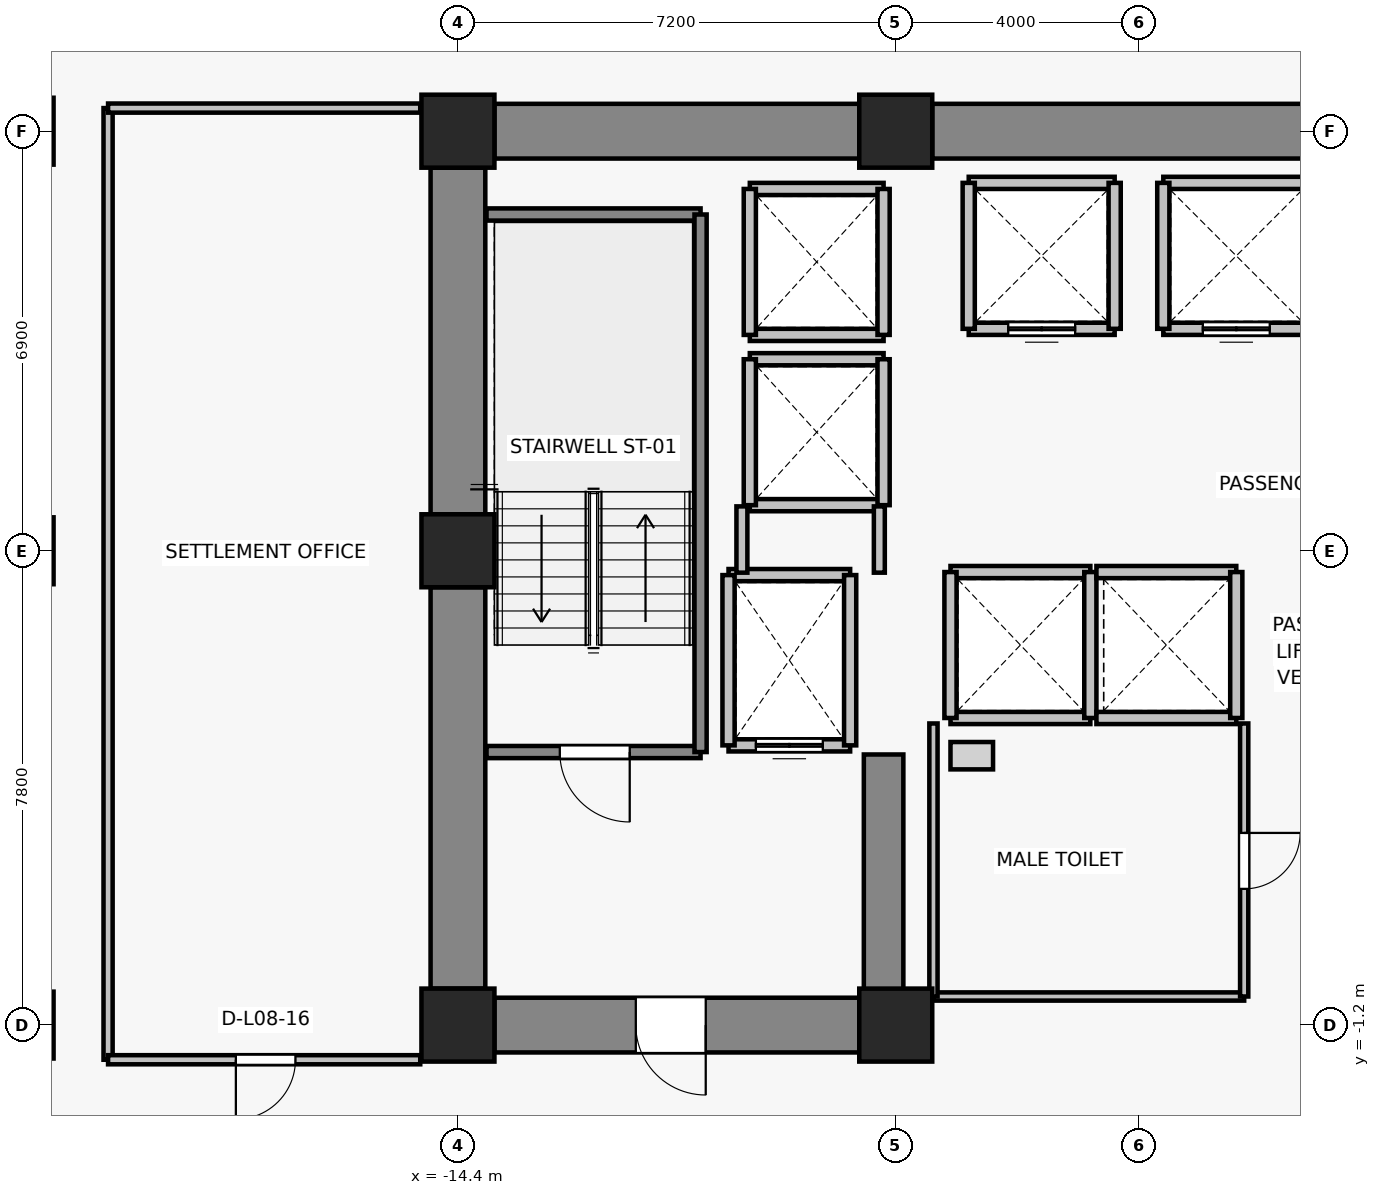
"""IFC4 building model, lengths in metres.
Left out: names, types, materials, properties, quantities, classifications, styles, units other than length and angle.
Written with IfcOpenShell. Run it as: python <this file> out.ifc"""

import sys

from ifc_helpers import new_model, si_unit, direction, frame, frame_2d, origin, origin_2d, place, context, subcontext, project, spatial, rectangle, extrude, source, transform, mapped, element, fill, save


model = new_model("IFC4")
c1 = context("Model", 3, precision=1e-05, world=origin(), true_north=direction((0.0, 1.0)))
c2 = subcontext(c1, "Body", "Model", "MODEL_VIEW")
j1 = project(units=[si_unit("LENGTHUNIT", "METRE"), si_unit("PLANEANGLEUNIT", "RADIAN")], contexts=[c1])
p1 = place(None, origin())
s1 = spatial("IfcSite", under=j1, at=p1, CompositionType="ELEMENT")
p2 = place(p1, origin())
s2 = spatial("IfcBuilding", under=s1, at=p2, CompositionType="ELEMENT")
p3 = place(p2, frame((0.0, 0.0, 34.0)))
s3 = spatial("IfcBuildingStorey", under=s2, at=p3, CompositionType="ELEMENT", Elevation=34.0)
for number, where, z_axis, x_axis in (
    (1, (-14.4, -1.2, 0.0), (0.0, 0.0, 1.0), (1.0, 0.0, 0.0)),
    (2, (-7.2, -1.2, 0.0), (0.0, 0.0, 1.0), (1.0, 0.0, 0.0)),
    (3, (-14.4, 6.6, 0.0), (0.0, 0.0, 1.0), (1.0, 0.0, 0.0)),
    (4, (-14.4, 13.5, 0.0), (0.0, 0.0, 1.0), (1.0, 0.0, 0.0)),
    (5, (-7.2, 13.5, 0.0), (0.0, 0.0, 1.0), (1.0, 0.0, 0.0)),
):
    element("IfcColumn", number, at=place(p3, frame(where, z_axis=z_axis, x_axis=x_axis)), inside=s3, PredefinedType="COLUMN", context=c2, shape_type="SweptSolid", body=[
        extrude(rectangle(XDim=1.2, YDim=1.2, at=origin_2d()), origin(), (0.0, 0.0, 1.0), 3.3),
    ])
for number, where, z_axis, x_axis in (
    (6, (-21.6, -1.2, 0.0), (0.0, 0.0, 1.0), (1.0, 0.0, 0.0)),
    (7, (-21.6, 6.6, 0.0), (0.0, 0.0, 1.0), (1.0, 0.0, 0.0)),
    (8, (-21.6, 13.5, 0.0), (0.0, 0.0, 1.0), (1.0, 0.0, 0.0)),
):
    element("IfcColumn", number, at=place(p3, frame(where, z_axis=z_axis, x_axis=x_axis)), inside=s3, PredefinedType="COLUMN", context=c2, shape_type="SweptSolid", body=[
        extrude(rectangle(XDim=1.1, YDim=1.1, at=origin_2d()), origin(), (0.0, 0.0, 1.0), 3.3),
    ])
p4 = place(p3, frame((-13.8, 13.5, 0.0), z_axis=(0.0, 0.0, 1.0), x_axis=(1.0, 0.0, 0.0)))
e9 = element("IfcWall", 9, at=p4, inside=s3, PredefinedType="SHEAR", context=c2, shape_type="SweptSolid", body=[
    extrude(rectangle(XDim=6.0, YDim=0.9, at=frame_2d((3.0, 0.0))), origin(), (0.0, 0.0, 1.0), 3.075),
])
p5 = place(p3, frame((-6.6, 13.5, 0.0), z_axis=(0.0, 0.0, 1.0), x_axis=(1.0, 0.0, 0.0)))
e10 = element("IfcWall", 10, at=p5, inside=s3, PredefinedType="SHEAR", context=c2, shape_type="SweptSolid", body=[
    extrude(rectangle(XDim=13.2, YDim=0.9, at=frame_2d((6.6, 0.0))), origin(), (0.0, 0.0, 1.0), 3.075),
])
p6 = place(p3, frame((-14.4, -0.6, 0.0), z_axis=(0.0, 0.0, 1.0), x_axis=(0.0, 1.0, 0.0)))
e11 = element("IfcWall", 11, at=p6, inside=s3, PredefinedType="SHEAR", context=c2, shape_type="SweptSolid", body=[
    extrude(rectangle(XDim=6.6, YDim=0.9, at=frame_2d((3.3, 0.0))), origin(), (0.0, 0.0, 1.0), 3.075),
])
p7 = place(p3, frame((-14.4, 7.2, 0.0), z_axis=(0.0, 0.0, 1.0), x_axis=(0.0, 1.0, 0.0)))
e12 = element("IfcWall", 12, at=p7, inside=s3, PredefinedType="SHEAR", context=c2, shape_type="SweptSolid", body=[
    extrude(rectangle(XDim=5.7, YDim=0.9, at=frame_2d((2.85, 0.0))), origin(), (0.0, 0.0, 1.0), 3.075),
])
p8 = place(p3, frame((-7.8, -1.2, 0.0), z_axis=(0.0, 0.0, 1.0), x_axis=(-1.0, 0.0, 0.0)))
e13 = element("IfcWall", 13, at=p8, inside=s3, PredefinedType="SHEAR", context=c2, shape_type="SweptSolid", body=[
    extrude(rectangle(XDim=6.0, YDim=0.9, at=frame_2d((3.0, 0.0))), origin(), (0.0, 0.0, 1.0), 3.075),
])
p9 = place(p8, frame((2.525, 0.0, 0.0)))
e14 = element("IfcOpeningElement", 14, at=p9, cuts=e13, PredefinedType="OPENING", context=c2, shape_type="SweptSolid", body=[
    extrude(rectangle(XDim=1.15, YDim=2.15, at=frame_2d((0.575, 1.075))), frame((0.0, 0.46, 0.0), z_axis=(0.0, -1.0, 0.0), x_axis=(1.0, 0.0, 0.0)), (0.0, 0.0, 1.0), 0.92),
])
p10 = place(p3, frame((-7.4, -0.75, 0.0), z_axis=(0.0, 0.0, 1.0), x_axis=(0.0, 1.0, 0.0)))
e15 = element("IfcWall", 15, at=p10, inside=s3, PredefinedType="SHEAR", context=c2, shape_type="SweptSolid", body=[
    extrude(rectangle(XDim=4.0, YDim=0.65, at=frame_2d((2.0, 0.0))), origin(), (0.0, 0.0, 1.0), 3.075),
])
p11 = place(p3, frame((-7.95, 3.4, 0.0), z_axis=(0.0, 0.0, 1.0), x_axis=(-1.0, 0.0, 0.0)))
e16 = element("IfcWall", 16, at=p11, inside=s3, PredefinedType="SOLIDWALL", context=c2, shape_type="SweptSolid", body=[
    extrude(rectangle(XDim=2.0, YDim=0.2, at=frame_2d((1.0, 0.0))), origin(), (0.0, 0.0, 1.0), 3.075),
])
p12 = place(p11, frame((0.45, 0.0, 0.0)))
e17 = element("IfcOpeningElement", 17, at=p12, cuts=e16, PredefinedType="OPENING", context=c2, shape_type="SweptSolid", body=[
    extrude(rectangle(XDim=1.1, YDim=2.2, at=frame_2d((0.55, 1.1))), frame((0.0, 0.11, 0.0), z_axis=(0.0, -1.0, 0.0), x_axis=(1.0, 0.0, 0.0)), (0.0, 0.0, 1.0), 0.22),
])
p13 = place(p3, frame((-9.95, 6.2, 0.0), z_axis=(0.0, 0.0, 1.0), x_axis=(1.0, 0.0, 0.0)))
e18 = element("IfcWall", 18, at=p13, inside=s3, PredefinedType="SOLIDWALL", context=c2, shape_type="SweptSolid", body=[
    extrude(rectangle(XDim=2.0, YDim=0.2, at=frame_2d((1.0, 0.0))), origin(), (0.0, 0.0, 1.0), 3.075),
])
for number, where, z_axis, x_axis in (
    (19, (-9.95, 3.4, 0.0), (0.0, 0.0, 1.0), (0.0, 1.0, 0.0)),
    (20, (-7.95, 6.2, 0.0), (0.0, 0.0, 1.0), (0.0, -1.0, 0.0)),
):
    element("IfcWall", number, at=place(p3, frame(where, z_axis=z_axis, x_axis=x_axis)), inside=s3, PredefinedType="SOLIDWALL", context=c2, shape_type="SweptSolid", body=[
        extrude(rectangle(XDim=2.8, YDim=0.2, at=frame_2d((1.4, 0.0))), origin(), (0.0, 0.0, 1.0), 3.075),
    ])
p14 = place(p3, frame((-3.6, 10.25, 0.0), z_axis=(0.0, 0.0, 1.0), x_axis=(-1.0, 0.0, 0.0)))
e21 = element("IfcWall", 21, at=p14, inside=s3, PredefinedType="SOLIDWALL", context=c2, shape_type="SweptSolid", body=[
    extrude(rectangle(XDim=2.4, YDim=0.2, at=frame_2d((1.2, 0.0))), origin(), (0.0, 0.0, 1.0), 3.075),
])
p15 = place(p14, frame((0.65, 0.0, 0.0)))
e22 = element("IfcOpeningElement", 22, at=p15, cuts=e21, PredefinedType="OPENING", context=c2, shape_type="SweptSolid", body=[
    extrude(rectangle(XDim=1.1, YDim=2.2, at=frame_2d((0.55, 1.1))), frame((0.0, 0.11, 0.0), z_axis=(0.0, -1.0, 0.0), x_axis=(1.0, 0.0, 0.0)), (0.0, 0.0, 1.0), 0.22),
])
for number, where, z_axis, x_axis in (
    (23, (-6.0, 12.65, 0.0), (0.0, 0.0, 1.0), (1.0, 0.0, 0.0)),
    (24, (-6.0, 10.25, 0.0), (0.0, 0.0, 1.0), (0.0, 1.0, 0.0)),
    (25, (-3.6, 12.65, 0.0), (0.0, 0.0, 1.0), (0.0, -1.0, 0.0)),
):
    element("IfcWall", number, at=place(p3, frame(where, z_axis=z_axis, x_axis=x_axis)), inside=s3, PredefinedType="SOLIDWALL", context=c2, shape_type="SweptSolid", body=[
        extrude(rectangle(XDim=2.4, YDim=0.2, at=frame_2d((1.2, 0.0))), origin(), (0.0, 0.0, 1.0), 3.075),
    ])
p16 = place(p3, frame((-0.4, 10.25, 0.0), z_axis=(0.0, 0.0, 1.0), x_axis=(-1.0, 0.0, 0.0)))
e26 = element("IfcWall", 26, at=p16, inside=s3, PredefinedType="SOLIDWALL", context=c2, shape_type="SweptSolid", body=[
    extrude(rectangle(XDim=2.4, YDim=0.2, at=frame_2d((1.2, 0.0))), origin(), (0.0, 0.0, 1.0), 3.075),
])
p17 = place(p16, frame((0.65, 0.0, 0.0)))
e27 = element("IfcOpeningElement", 27, at=p17, cuts=e26, PredefinedType="OPENING", context=c2, shape_type="SweptSolid", body=[
    extrude(rectangle(XDim=1.1, YDim=2.2, at=frame_2d((0.55, 1.1))), frame((0.0, 0.11, 0.0), z_axis=(0.0, -1.0, 0.0), x_axis=(1.0, 0.0, 0.0)), (0.0, 0.0, 1.0), 0.22),
])
p18 = place(p3, frame((-2.8, 12.65, 0.0), z_axis=(0.0, 0.0, 1.0), x_axis=(1.0, 0.0, 0.0)))
e28 = element("IfcWall", 28, at=p18, inside=s3, PredefinedType="SOLIDWALL", context=c2, shape_type="SweptSolid", body=[
    extrude(rectangle(XDim=2.4, YDim=0.2, at=frame_2d((1.2, 0.0))), origin(), (0.0, 0.0, 1.0), 3.075),
])
p19 = place(p3, frame((-2.8, 10.25, 0.0), z_axis=(0.0, 0.0, 1.0), x_axis=(0.0, 1.0, 0.0)))
e29 = element("IfcWall", 29, at=p19, inside=s3, PredefinedType="SOLIDWALL", context=c2, shape_type="SweptSolid", body=[
    extrude(rectangle(XDim=2.4, YDim=0.2, at=frame_2d((1.2, 0.0))), origin(), (0.0, 0.0, 1.0), 3.075),
])
for number, where, z_axis, x_axis in (
    (30, (-4.0, 3.85, 0.0), (0.0, 0.0, 1.0), (-1.0, 0.0, 0.0)),
    (31, (-6.3, 6.25, 0.0), (0.0, 0.0, 1.0), (1.0, 0.0, 0.0)),
):
    element("IfcWall", number, at=place(p3, frame(where, z_axis=z_axis, x_axis=x_axis)), inside=s3, PredefinedType="SOLIDWALL", context=c2, shape_type="SweptSolid", body=[
        extrude(rectangle(XDim=2.3, YDim=0.2, at=frame_2d((1.15, 0.0))), origin(), (0.0, 0.0, 1.0), 3.075),
    ])
for number, where, z_axis, x_axis in (
    (32, (-6.3, 3.85, 0.0), (0.0, 0.0, 1.0), (0.0, 1.0, 0.0)),
    (33, (-4.0, 6.25, 0.0), (0.0, 0.0, 1.0), (0.0, -1.0, 0.0)),
):
    element("IfcWall", number, at=place(p3, frame(where, z_axis=z_axis, x_axis=x_axis)), inside=s3, PredefinedType="SOLIDWALL", context=c2, shape_type="SweptSolid", body=[
        extrude(rectangle(XDim=2.4, YDim=0.2, at=frame_2d((1.2, 0.0))), origin(), (0.0, 0.0, 1.0), 3.075),
    ])
for number, where, z_axis, x_axis in (
    (34, (-1.6, 3.85, 0.0), (0.0, 0.0, 1.0), (-1.0, 0.0, 0.0)),
    (35, (-3.9, 6.25, 0.0), (0.0, 0.0, 1.0), (1.0, 0.0, 0.0)),
):
    element("IfcWall", number, at=place(p3, frame(where, z_axis=z_axis, x_axis=x_axis)), inside=s3, PredefinedType="SOLIDWALL", context=c2, shape_type="SweptSolid", body=[
        extrude(rectangle(XDim=2.3, YDim=0.2, at=frame_2d((1.15, 0.0))), origin(), (0.0, 0.0, 1.0), 3.075),
    ])
p20 = place(p3, frame((-1.6, 6.25, 0.0), z_axis=(0.0, 0.0, 1.0), x_axis=(0.0, -1.0, 0.0)))
e36 = element("IfcWall", 36, at=p20, inside=s3, PredefinedType="SOLIDWALL", context=c2, shape_type="SweptSolid", body=[
    extrude(rectangle(XDim=2.4, YDim=0.2, at=frame_2d((1.2, 0.0))), origin(), (0.0, 0.0, 1.0), 3.075),
])
for number, where, z_axis, x_axis in (
    (37, (-7.4, 7.35, 0.0), (0.0, 0.0, 1.0), (-1.0, 0.0, 0.0)),
    (38, (-9.6, 9.75, 0.0), (0.0, 0.0, 1.0), (1.0, 0.0, 0.0)),
):
    element("IfcWall", number, at=place(p3, frame(where, z_axis=z_axis, x_axis=x_axis)), inside=s3, PredefinedType="SOLIDWALL", context=c2, shape_type="SweptSolid", body=[
        extrude(rectangle(XDim=2.2, YDim=0.2, at=frame_2d((1.1, 0.0))), origin(), (0.0, 0.0, 1.0), 2.465),
    ])
p21 = place(p3, frame((-9.6, 7.35, 0.0), z_axis=(0.0, 0.0, 1.0), x_axis=(0.0, 1.0, 0.0)))
e39 = element("IfcWall", 39, at=p21, inside=s3, PredefinedType="SOLIDWALL", context=c2, shape_type="SweptSolid", body=[
    extrude(rectangle(XDim=2.4, YDim=0.2, at=frame_2d((1.2, 0.0))), origin(), (0.0, 0.0, 1.0), 3.075),
])
p22 = place(p3, frame((-7.4, 9.75, 0.0), z_axis=(0.0, 0.0, 1.0), x_axis=(0.0, -1.0, 0.0)))
e40 = element("IfcWall", 40, at=p22, inside=s3, PredefinedType="SOLIDWALL", context=c2, shape_type="SweptSolid", body=[
    extrude(rectangle(XDim=2.4, YDim=0.2, at=frame_2d((1.2, 0.0))), origin(), (0.0, 0.0, 1.0), 2.465),
])
for number, where, z_axis, x_axis in (
    (41, (-7.4, 10.15, 0.0), (0.0, 0.0, 1.0), (-1.0, 0.0, 0.0)),
    (42, (-9.6, 12.55, 0.0), (0.0, 0.0, 1.0), (1.0, 0.0, 0.0)),
):
    element("IfcWall", number, at=place(p3, frame(where, z_axis=z_axis, x_axis=x_axis)), inside=s3, PredefinedType="SOLIDWALL", context=c2, shape_type="SweptSolid", body=[
        extrude(rectangle(XDim=2.2, YDim=0.2, at=frame_2d((1.1, 0.0))), origin(), (0.0, 0.0, 1.0), 2.465),
    ])
p23 = place(p3, frame((-9.6, 10.15, 0.0), z_axis=(0.0, 0.0, 1.0), x_axis=(0.0, 1.0, 0.0)))
e43 = element("IfcWall", 43, at=p23, inside=s3, PredefinedType="SOLIDWALL", context=c2, shape_type="SweptSolid", body=[
    extrude(rectangle(XDim=2.4, YDim=0.2, at=frame_2d((1.2, 0.0))), origin(), (0.0, 0.0, 1.0), 3.075),
])
p24 = place(p3, frame((-7.4, 12.55, 0.0), z_axis=(0.0, 0.0, 1.0), x_axis=(0.0, -1.0, 0.0)))
e44 = element("IfcWall", 44, at=p24, inside=s3, PredefinedType="SOLIDWALL", context=c2, shape_type="SweptSolid", body=[
    extrude(rectangle(XDim=2.4, YDim=0.2, at=frame_2d((1.2, 0.0))), origin(), (0.0, 0.0, 1.0), 2.465),
])
p25 = place(p3, frame((-10.41, 3.29, 0.0), z_axis=(0.0, 0.0, 1.0), x_axis=(-1.0, 0.0, 0.0)))
e45 = element("IfcWall", 45, at=p25, inside=s3, PredefinedType="SOLIDWALL", context=c2, shape_type="SweptSolid", body=[
    extrude(rectangle(XDim=3.52, YDim=0.2, at=frame_2d((1.76, 0.0))), origin(), (0.0, 0.0, 1.0), 3.075),
])
p26 = place(p25, frame((1.165, 0.0, 0.0)))
e46 = element("IfcOpeningElement", 46, at=p26, cuts=e45, PredefinedType="OPENING", context=c2, shape_type="SweptSolid", body=[
    extrude(rectangle(XDim=1.15, YDim=2.15, at=frame_2d((0.575, 1.075))), frame((0.0, 0.11, 0.0), z_axis=(0.0, -1.0, 0.0), x_axis=(1.0, 0.0, 0.0)), (0.0, 0.0, 1.0), 0.22),
])
p27 = place(p3, frame((-13.93, 12.13, 0.0), z_axis=(0.0, 0.0, 1.0), x_axis=(1.0, 0.0, 0.0)))
e47 = element("IfcWall", 47, at=p27, inside=s3, PredefinedType="SOLIDWALL", context=c2, shape_type="SweptSolid", body=[
    extrude(rectangle(XDim=3.52, YDim=0.2, at=frame_2d((1.76, 0.0))), origin(), (0.0, 0.0, 1.0), 3.075),
])
p28 = place(p3, frame((-10.41, 12.13, 0.0), z_axis=(0.0, 0.0, 1.0), x_axis=(0.0, -1.0, 0.0)))
e48 = element("IfcWall", 48, at=p28, inside=s3, PredefinedType="SOLIDWALL", context=c2, shape_type="SweptSolid", body=[
    extrude(rectangle(XDim=8.84, YDim=0.2, at=frame_2d((4.42, 0.0))), origin(), (0.0, 0.0, 1.0), 3.075),
])
p29 = place(p3, frame((-9.73, 6.24, 0.0), z_axis=(0.0, 0.0, 1.0), x_axis=(0.0, 1.0, 0.0)))
e49 = element("IfcWall", 49, at=p29, inside=s3, PredefinedType="PARTITIONING", context=c2, shape_type="SweptSolid", body=[
    extrude(rectangle(XDim=1.09, YDim=0.18, at=frame_2d((0.545, 0.0))), origin(), (0.0, 0.0, 1.0), 3.075),
])
p30 = place(p3, frame((-7.47, 7.33, 0.0), z_axis=(0.0, 0.0, 1.0), x_axis=(0.0, -1.0, 0.0)))
e50 = element("IfcWall", 50, at=p30, inside=s3, PredefinedType="PARTITIONING", context=c2, shape_type="SweptSolid", body=[
    extrude(rectangle(XDim=1.09, YDim=0.18, at=frame_2d((0.545, 0.0))), origin(), (0.0, 0.0, 1.0), 2.465),
])
p31 = place(p3, frame((-1.47, -0.73, 0.0), z_axis=(0.0, 0.0, 1.0), x_axis=(-1.0, 0.0, 0.0)))
e51 = element("IfcWall", 51, at=p31, inside=s3, PredefinedType="PARTITIONING", context=c2, shape_type="SweptSolid", body=[
    extrude(rectangle(XDim=5.11, YDim=0.135, at=frame_2d((2.555, 0.0))), origin(), (0.0, 0.0, 1.0), 3.075),
])
p32 = place(p3, frame((-6.58, -0.73, 0.0), z_axis=(0.0, 0.0, 1.0), x_axis=(0.0, 1.0, 0.0)))
e52 = element("IfcWall", 52, at=p32, inside=s3, PredefinedType="PARTITIONING", context=c2, shape_type="SweptSolid", body=[
    extrude(rectangle(XDim=4.49, YDim=0.135, at=frame_2d((2.245, 0.0))), origin(), (0.0, 0.0, 1.0), 3.075),
])
p33 = place(p3, frame((-1.47, 3.76, 0.0), z_axis=(0.0, 0.0, 1.0), x_axis=(0.0, -1.0, 0.0)))
e53 = element("IfcWall", 53, at=p33, inside=s3, PredefinedType="PARTITIONING", context=c2, shape_type="SweptSolid", body=[
    extrude(rectangle(XDim=4.49, YDim=0.135, at=frame_2d((2.245, 0.0))), origin(), (0.0, 0.0, 1.0), 3.075),
])
p34 = place(p33, frame((1.8, 0.0, 0.0)))
e54 = element("IfcOpeningElement", 54, at=p34, cuts=e53, PredefinedType="OPENING", context=c2, shape_type="SweptSolid", body=[
    extrude(rectangle(XDim=0.92, YDim=2.1, at=frame_2d((0.46, 1.05))), frame((0.0, 0.077, 0.0), z_axis=(0.0, -1.0, 0.0), x_axis=(1.0, 0.0, 0.0)), (0.0, 0.0, 1.0), 0.155),
])
p35 = place(p3, frame((-20.154, 13.88, 0.0), z_axis=(0.0, 0.0, 1.0), x_axis=(0.0, -1.0, 0.0)))
e55 = element("IfcWall", 55, at=p35, inside=s3, PredefinedType="PARTITIONING", context=c2, shape_type="SweptSolid", body=[
    extrude(rectangle(XDim=15.65, YDim=0.15, at=frame_2d((7.825, 0.0))), origin(), (0.0, 0.0, 1.0), 2.465),
])
p36 = place(p3, frame((-15.02, -1.77, 0.0), z_axis=(0.0, 0.0, 1.0), x_axis=(-1.0, 0.0, 0.0)))
e56 = element("IfcWall", 56, at=p36, inside=s3, PredefinedType="PARTITIONING", context=c2, shape_type="SweptSolid", body=[
    extrude(rectangle(XDim=5.134, YDim=0.15, at=frame_2d((2.567, 0.0))), origin(), (0.0, 0.0, 1.0), 3.075),
])
p37 = place(p36, frame((2.052, 0.0, 0.0)))
e57 = element("IfcOpeningElement", 57, at=p37, cuts=e56, PredefinedType="OPENING", context=c2, shape_type="SweptSolid", body=[
    extrude(rectangle(XDim=0.98, YDim=2.15, at=frame_2d((0.49, 1.075))), frame((0.0, 0.085, 0.0), z_axis=(0.0, -1.0, 0.0), x_axis=(1.0, 0.0, 0.0)), (0.0, 0.0, 1.0), 0.17),
])
p38 = place(p3, frame((-20.154, 13.88, 0.0), z_axis=(0.0, 0.0, 1.0), x_axis=(1.0, 0.0, 0.0)))
e58 = element("IfcWall", 58, at=p38, inside=s3, PredefinedType="PARTITIONING", context=c2, shape_type="SweptSolid", body=[
    extrude(rectangle(XDim=5.134, YDim=0.15, at=frame_2d((2.567, 0.0))), origin(), (0.0, 0.0, 1.0), 3.075),
])
m1 = source(origin(), c2, "Body", "SweptSolid", [
    extrude(rectangle(XDim=1.1, YDim=2.2, at=frame_2d((0.55, 1.1))), frame((0.0, 0.025, 0.0), z_axis=(0.0, -1.0, 0.0), x_axis=(1.0, 0.0, 0.0)), (0.0, 0.0, 1.0), 0.05),
])
p39 = place(p12, origin())
e59 = element("IfcDoor", 59, at=p39, inside=s3, OperationType="DOUBLE_DOOR_SLIDING", PredefinedType="DOOR", context=c2, shape_type="MappedRepresentation", body=[
    mapped(m1, transform((0.0, 0.0, 0.0), x_axis=(1.0, 0.0, 0.0), y_axis=(0.0, 1.0, 0.0), z_axis=(0.0, 0.0, 1.0), scale=1.0)),
])
fill(e17, e59)
p40 = place(p15, origin())
e60 = element("IfcDoor", 60, at=p40, inside=s3, OperationType="DOUBLE_DOOR_SLIDING", PredefinedType="DOOR", context=c2, shape_type="MappedRepresentation", body=[
    mapped(m1, transform((0.0, 0.0, 0.0), x_axis=(1.0, 0.0, 0.0), y_axis=(0.0, 1.0, 0.0), z_axis=(0.0, 0.0, 1.0), scale=1.0)),
])
fill(e22, e60)
p41 = place(p17, origin())
e61 = element("IfcDoor", 61, at=p41, inside=s3, OperationType="DOUBLE_DOOR_SLIDING", PredefinedType="DOOR", context=c2, shape_type="MappedRepresentation", body=[
    mapped(m1, transform((0.0, 0.0, 0.0), x_axis=(1.0, 0.0, 0.0), y_axis=(0.0, 1.0, 0.0), z_axis=(0.0, 0.0, 1.0), scale=1.0)),
])
fill(e27, e61)
m2 = source(origin(), c2, "Body", "SweptSolid", [
    extrude(rectangle(XDim=1.15, YDim=2.15, at=frame_2d((0.575, 1.075))), frame((0.0, 0.025, 0.0), z_axis=(0.0, -1.0, 0.0), x_axis=(1.0, 0.0, 0.0)), (0.0, 0.0, 1.0), 0.05),
])
p42 = place(p26, origin())
e62 = element("IfcDoor", 62, at=p42, inside=s3, OperationType="SINGLE_SWING_LEFT", PredefinedType="DOOR", context=c2, shape_type="MappedRepresentation", body=[
    mapped(m2, transform((0.0, 0.0, 0.0), x_axis=(1.0, 0.0, 0.0), y_axis=(0.0, 1.0, 0.0), z_axis=(0.0, 0.0, 1.0), scale=1.0)),
])
fill(e46, e62)
p43 = place(p9, origin())
e63 = element("IfcDoor", 63, at=p43, inside=s3, OperationType="SINGLE_SWING_LEFT", PredefinedType="DOOR", context=c2, shape_type="MappedRepresentation", body=[
    mapped(m2, transform((0.0, 0.0, 0.0), x_axis=(1.0, 0.0, 0.0), y_axis=(0.0, 1.0, 0.0), z_axis=(0.0, 0.0, 1.0), scale=1.0)),
])
fill(e14, e63)
m3 = source(origin(), c2, "Body", "SweptSolid", [
    extrude(rectangle(XDim=0.92, YDim=2.1, at=frame_2d((0.46, 1.05))), frame((0.0, 0.025, 0.0), z_axis=(0.0, -1.0, 0.0), x_axis=(1.0, 0.0, 0.0)), (0.0, 0.0, 1.0), 0.05),
])
p44 = place(p34, origin())
e64 = element("IfcDoor", 64, at=p44, inside=s3, OperationType="SINGLE_SWING_LEFT", PredefinedType="DOOR", context=c2, shape_type="MappedRepresentation", body=[
    mapped(m3, transform((0.0, 0.0, 0.0), x_axis=(1.0, 0.0, 0.0), y_axis=(0.0, 1.0, 0.0), z_axis=(0.0, 0.0, 1.0), scale=1.0)),
])
fill(e54, e64)
m4 = source(origin(), c2, "Body", "SweptSolid", [
    extrude(rectangle(XDim=0.98, YDim=2.15, at=frame_2d((0.49, 1.075))), frame((0.0, 0.025, 0.0), z_axis=(0.0, -1.0, 0.0), x_axis=(1.0, 0.0, 0.0)), (0.0, 0.0, 1.0), 0.05),
])
p45 = place(p37, origin())
e65 = element("IfcDoor", 65, at=p45, inside=s3, OperationType="SINGLE_SWING_RIGHT", PredefinedType="DOOR", context=c2, shape_type="MappedRepresentation", body=[
    mapped(m4, transform((0.0, 0.0, 0.0), x_axis=(1.0, 0.0, 0.0), y_axis=(0.0, 1.0, 0.0), z_axis=(0.0, 0.0, 1.0), scale=1.0)),
])
fill(e57, e65)
save(model, sys.argv[1])
